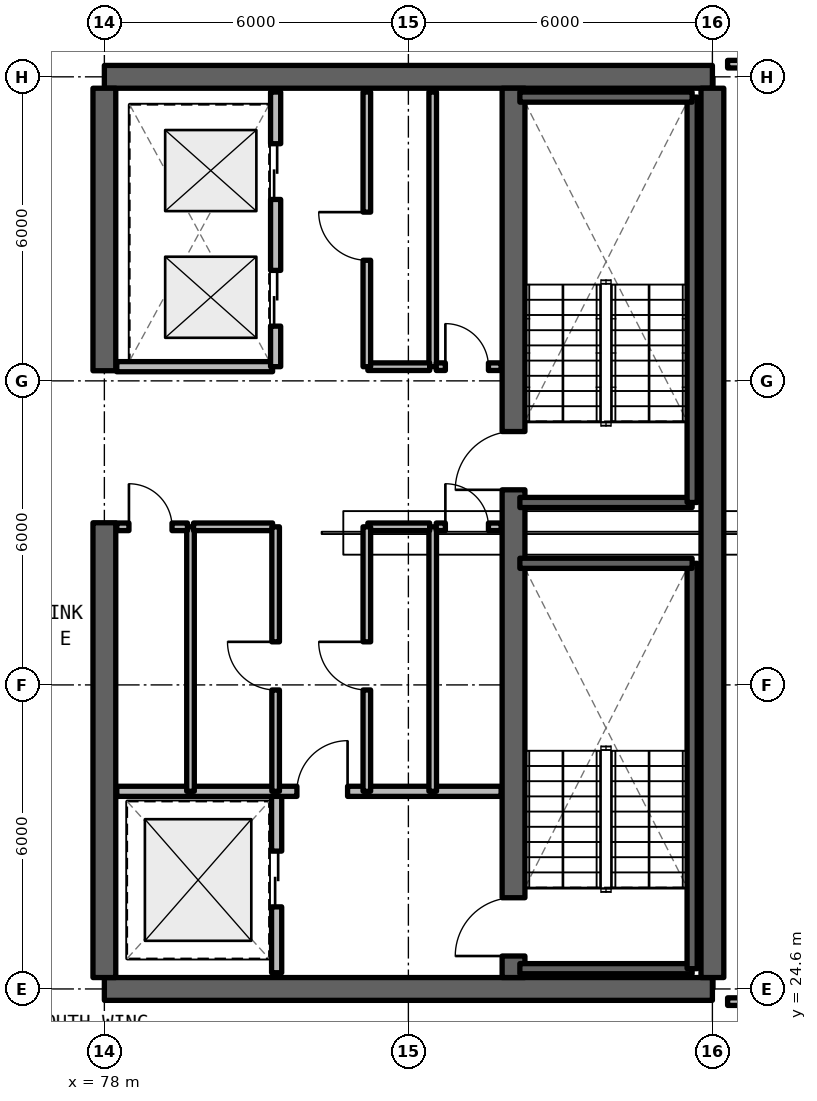
"""IFC4 building model, lengths in metres.
Left out: names, types, materials, properties, quantities, classifications, styles, units other than length and angle.
Written with IfcOpenShell. Run it as: python <this file> out.ifc"""

import sys

from ifc_helpers import new_model, si_unit, direction, frame, frame_2d, origin, place, context, subcontext, project, spatial, rectangle, extrude, element, fill, save


model = new_model("IFC4")
c1 = context("Model", 3, precision=1e-05, world=origin(), true_north=direction((0.0, 1.0)))
c2 = subcontext(c1, "Body", "Model", "MODEL_VIEW")
j1 = project(units=[si_unit("LENGTHUNIT", "METRE"), si_unit("PLANEANGLEUNIT", "RADIAN")], contexts=[c1])
p1 = place(None, origin())
s1 = spatial("IfcSite", under=j1, at=p1, CompositionType="ELEMENT")
p2 = place(p1, origin())
s2 = spatial("IfcBuilding", under=s1, at=p2, CompositionType="ELEMENT")
p3 = place(p2, frame((0.0, 0.0, 232.65)))
s3 = spatial("IfcBuildingStorey", under=s2, at=p3, CompositionType="ELEMENT", Elevation=232.65)
for number, where, z_axis, x_axis in (
    (1, (78.0, 24.6, 0.0), (0.0, 0.0, 1.0), (1.0, 0.0, 0.0)),
    (2, (90.0, 42.6, 0.0), (0.0, 0.0, 1.0), (-1.0, 0.0, 0.0)),
):
    element("IfcWall", number, at=place(p3, frame(where, z_axis=z_axis, x_axis=x_axis)), inside=s3, PredefinedType="SHEAR", context=c2, shape_type="SweptSolid", body=[
        extrude(rectangle(XDim=12.0, YDim=0.45, at=frame_2d((6.0, 0.0))), origin(), (0.0, 0.0, 1.0), 3.3),
    ])
p4 = place(p3, frame((90.0, 24.825, 0.0), z_axis=(0.0, 0.0, 1.0), x_axis=(0.0, 1.0, 0.0)))
e3 = element("IfcWall", 3, at=p4, inside=s3, PredefinedType="SHEAR", context=c2, shape_type="SweptSolid", body=[
    extrude(rectangle(XDim=17.55, YDim=0.45, at=frame_2d((8.775, 0.0))), origin(), (0.0, 0.0, 1.0), 3.3),
])
p5 = place(p3, frame((78.0, 24.825, 0.0), z_axis=(0.0, 0.0, 1.0), x_axis=(0.0, 1.0, 0.0)))
e4 = element("IfcWall", 4, at=p5, inside=s3, PredefinedType="SHEAR", context=c2, shape_type="SweptSolid", body=[
    extrude(rectangle(XDim=8.975, YDim=0.45, at=frame_2d((4.488, 0.0))), origin(), (0.0, 0.0, 1.0), 3.3),
])
p6 = place(p3, frame((78.0, 36.8, 0.0), z_axis=(0.0, 0.0, 1.0), x_axis=(0.0, 1.0, 0.0)))
e5 = element("IfcWall", 5, at=p6, inside=s3, PredefinedType="SHEAR", context=c2, shape_type="SweptSolid", body=[
    extrude(rectangle(XDim=5.575, YDim=0.45, at=frame_2d((2.788, 0.0))), origin(), (0.0, 0.0, 1.0), 3.3),
])
p7 = place(p3, frame((86.075, 24.825, 0.0), z_axis=(0.0, 0.0, 1.0), x_axis=(0.0, 1.0, 0.0)))
e6 = element("IfcWall", 6, at=p7, inside=s3, PredefinedType="SHEAR", context=c2, shape_type="SweptSolid", body=[
    extrude(rectangle(XDim=17.55, YDim=0.45, at=frame_2d((8.775, 0.0))), origin(), (0.0, 0.0, 1.0), 3.3),
])
p8 = place(p7, frame((0.425, 0.0, 0.0)))
e7 = element("IfcOpeningElement", 7, at=p8, cuts=e6, PredefinedType="OPENING", context=c2, shape_type="SweptSolid", body=[
    extrude(rectangle(XDim=1.15, YDim=2.15, at=frame_2d((0.575, 1.075))), frame((0.0, 0.235, 0.0), z_axis=(0.0, -1.0, 0.0), x_axis=(1.0, 0.0, 0.0)), (0.0, 0.0, 1.0), 0.47),
])
p9 = place(p7, frame((9.625, 0.0, 0.0)))
e8 = element("IfcOpeningElement", 8, at=p9, cuts=e6, PredefinedType="OPENING", context=c2, shape_type="SweptSolid", body=[
    extrude(rectangle(XDim=1.15, YDim=2.15, at=frame_2d((0.575, 1.075))), frame((0.0, 0.235, 0.0), z_axis=(0.0, -1.0, 0.0), x_axis=(1.0, 0.0, 0.0)), (0.0, 0.0, 1.0), 0.47),
])
p10 = place(p3, frame((81.4, 24.92, 0.0), z_axis=(0.0, 0.0, 1.0), x_axis=(0.0, 1.0, 0.0)))
e9 = element("IfcWall", 9, at=p10, inside=s3, PredefinedType="SOLIDWALL", context=c2, shape_type="SweptSolid", body=[
    extrude(rectangle(XDim=3.58, YDim=0.2, at=frame_2d((1.79, 0.0))), origin(), (0.0, 0.0, 1.0), 2.35),
])
p11 = place(p10, frame((1.3, 0.0, 0.0)))
e10 = element("IfcOpeningElement", 10, at=p11, cuts=e9, PredefinedType="OPENING", context=c2, shape_type="SweptSolid", body=[
    extrude(rectangle(XDim=1.1, YDim=2.2, at=frame_2d((0.55, 1.1))), frame((0.0, 0.11, 0.0), z_axis=(0.0, -1.0, 0.0), x_axis=(1.0, 0.0, 0.0)), (0.0, 0.0, 1.0), 0.22),
])
p12 = place(p3, frame((78.245, 28.5, 0.0), z_axis=(0.0, 0.0, 1.0), x_axis=(1.0, 0.0, 0.0)))
e11 = element("IfcWall", 11, at=p12, inside=s3, PredefinedType="SOLIDWALL", context=c2, shape_type="SweptSolid", body=[
    extrude(rectangle(XDim=7.585, YDim=0.2, at=frame_2d((3.792, 0.0))), origin(), (0.0, 0.0, 1.0), 2.35),
])
p13 = place(p12, frame((3.555, 0.0, 0.0)))
e12 = element("IfcOpeningElement", 12, at=p13, cuts=e11, PredefinedType="OPENING", context=c2, shape_type="SweptSolid", body=[
    extrude(rectangle(XDim=1.0, YDim=2.15, at=frame_2d((0.5, 1.075))), frame((0.0, 0.11, 0.0), z_axis=(0.0, -1.0, 0.0), x_axis=(1.0, 0.0, 0.0)), (0.0, 0.0, 1.0), 0.22),
])
p14 = place(p3, frame((84.48, 28.5, 0.0), z_axis=(0.0, 0.0, 1.0), x_axis=(0.0, 1.0, 0.0)))
e13 = element("IfcWall", 13, at=p14, inside=s3, PredefinedType="SOLIDWALL", context=c2, shape_type="SweptSolid", body=[
    extrude(rectangle(XDim=5.22, YDim=0.15, at=frame_2d((2.61, 0.0))), origin(), (0.0, 0.0, 1.0), 2.35),
])
p15 = place(p3, frame((84.55, 33.72, 0.0), z_axis=(0.0, 0.0, 1.0), x_axis=(1.0, 0.0, 0.0)))
e14 = element("IfcWall", 14, at=p15, inside=s3, PredefinedType="SOLIDWALL", context=c2, shape_type="SweptSolid", body=[
    extrude(rectangle(XDim=1.28, YDim=0.15, at=frame_2d((0.64, 0.0))), origin(), (0.0, 0.0, 1.0), 2.35),
])
p16 = place(p15, frame((0.18, 0.0, 0.0)))
e15 = element("IfcOpeningElement", 15, at=p16, cuts=e14, PredefinedType="OPENING", context=c2, shape_type="SweptSolid", body=[
    extrude(rectangle(XDim=0.85, YDim=2.1, at=frame_2d((0.425, 1.05))), frame((0.0, 0.085, 0.0), z_axis=(0.0, -1.0, 0.0), x_axis=(1.0, 0.0, 0.0)), (0.0, 0.0, 1.0), 0.17),
])
p17 = place(p3, frame((83.2, 33.72, 0.0), z_axis=(0.0, 0.0, 1.0), x_axis=(1.0, 0.0, 0.0)))
e16 = element("IfcWall", 16, at=p17, inside=s3, PredefinedType="SOLIDWALL", context=c2, shape_type="SweptSolid", body=[
    extrude(rectangle(XDim=1.22, YDim=0.15, at=frame_2d((0.61, 0.0))), origin(), (0.0, 0.0, 1.0), 2.35),
])
p18 = place(p3, frame((83.18, 28.5, 0.0), z_axis=(0.0, 0.0, 1.0), x_axis=(0.0, 1.0, 0.0)))
e17 = element("IfcWall", 17, at=p18, inside=s3, PredefinedType="SOLIDWALL", context=c2, shape_type="SweptSolid", body=[
    extrude(rectangle(XDim=5.22, YDim=0.15, at=frame_2d((2.61, 0.0))), origin(), (0.0, 0.0, 1.0), 2.35),
])
p19 = place(p18, frame((2.0, 0.0, 0.0)))
e18 = element("IfcOpeningElement", 18, at=p19, cuts=e17, PredefinedType="OPENING", context=c2, shape_type="SweptSolid", body=[
    extrude(rectangle(XDim=0.95, YDim=2.15, at=frame_2d((0.475, 1.075))), frame((0.0, 0.085, 0.0), z_axis=(0.0, -1.0, 0.0), x_axis=(1.0, 0.0, 0.0)), (0.0, 0.0, 1.0), 0.17),
])
p20 = place(p3, frame((79.7, 28.5, 0.0), z_axis=(0.0, 0.0, 1.0), x_axis=(0.0, 1.0, 0.0)))
e19 = element("IfcWall", 19, at=p20, inside=s3, PredefinedType="SOLIDWALL", context=c2, shape_type="SweptSolid", body=[
    extrude(rectangle(XDim=5.22, YDim=0.15, at=frame_2d((2.61, 0.0))), origin(), (0.0, 0.0, 1.0), 2.35),
])
p21 = place(p3, frame((79.76, 33.72, 0.0), z_axis=(0.0, 0.0, 1.0), x_axis=(1.0, 0.0, 0.0)))
e20 = element("IfcWall", 20, at=p21, inside=s3, PredefinedType="SOLIDWALL", context=c2, shape_type="SweptSolid", body=[
    extrude(rectangle(XDim=1.56, YDim=0.15, at=frame_2d((0.78, 0.0))), origin(), (0.0, 0.0, 1.0), 2.35),
])
p22 = place(p3, frame((78.245, 33.72, 0.0), z_axis=(0.0, 0.0, 1.0), x_axis=(1.0, 0.0, 0.0)))
e21 = element("IfcWall", 21, at=p22, inside=s3, PredefinedType="SOLIDWALL", context=c2, shape_type="SweptSolid", body=[
    extrude(rectangle(XDim=1.395, YDim=0.15, at=frame_2d((0.697, 0.0))), origin(), (0.0, 0.0, 1.0), 2.35),
])
p23 = place(p22, frame((0.24, 0.0, 0.0)))
e22 = element("IfcOpeningElement", 22, at=p23, cuts=e21, PredefinedType="OPENING", context=c2, shape_type="SweptSolid", body=[
    extrude(rectangle(XDim=0.85, YDim=2.1, at=frame_2d((0.425, 1.05))), frame((0.0, 0.085, 0.0), z_axis=(0.0, -1.0, 0.0), x_axis=(1.0, 0.0, 0.0)), (0.0, 0.0, 1.0), 0.17),
])
p24 = place(p3, frame((81.38, 28.5, 0.0), z_axis=(0.0, 0.0, 1.0), x_axis=(0.0, 1.0, 0.0)))
e23 = element("IfcWall", 23, at=p24, inside=s3, PredefinedType="SOLIDWALL", context=c2, shape_type="SweptSolid", body=[
    extrude(rectangle(XDim=5.22, YDim=0.15, at=frame_2d((2.61, 0.0))), origin(), (0.0, 0.0, 1.0), 2.35),
])
p25 = place(p24, frame((2.0, 0.0, 0.0)))
e24 = element("IfcOpeningElement", 24, at=p25, cuts=e23, PredefinedType="OPENING", context=c2, shape_type="SweptSolid", body=[
    extrude(rectangle(XDim=0.95, YDim=2.15, at=frame_2d((0.475, 1.075))), frame((0.0, 0.085, 0.0), z_axis=(0.0, -1.0, 0.0), x_axis=(1.0, 0.0, 0.0)), (0.0, 0.0, 1.0), 0.17),
])
p26 = place(p3, frame((84.48, 36.88, 0.0), z_axis=(0.0, 0.0, 1.0), x_axis=(0.0, 1.0, 0.0)))
e25 = element("IfcWall", 25, at=p26, inside=s3, PredefinedType="SOLIDWALL", context=c2, shape_type="SweptSolid", body=[
    extrude(rectangle(XDim=5.42, YDim=0.15, at=frame_2d((2.71, 0.0))), origin(), (0.0, 0.0, 1.0), 2.35),
])
p27 = place(p3, frame((84.55, 36.88, 0.0), z_axis=(0.0, 0.0, 1.0), x_axis=(1.0, 0.0, 0.0)))
e26 = element("IfcWall", 26, at=p27, inside=s3, PredefinedType="SOLIDWALL", context=c2, shape_type="SweptSolid", body=[
    extrude(rectangle(XDim=1.28, YDim=0.15, at=frame_2d((0.64, 0.0))), origin(), (0.0, 0.0, 1.0), 2.35),
])
p28 = place(p27, frame((0.18, 0.0, 0.0)))
e27 = element("IfcOpeningElement", 27, at=p28, cuts=e26, PredefinedType="OPENING", context=c2, shape_type="SweptSolid", body=[
    extrude(rectangle(XDim=0.85, YDim=2.1, at=frame_2d((0.425, 1.05))), frame((0.0, 0.085, 0.0), z_axis=(0.0, -1.0, 0.0), x_axis=(1.0, 0.0, 0.0)), (0.0, 0.0, 1.0), 0.17),
])
p29 = place(p3, frame((83.2, 36.88, 0.0), z_axis=(0.0, 0.0, 1.0), x_axis=(1.0, 0.0, 0.0)))
e28 = element("IfcWall", 28, at=p29, inside=s3, PredefinedType="SOLIDWALL", context=c2, shape_type="SweptSolid", body=[
    extrude(rectangle(XDim=1.22, YDim=0.15, at=frame_2d((0.61, 0.0))), origin(), (0.0, 0.0, 1.0), 2.35),
])
p30 = place(p3, frame((83.18, 36.88, 0.0), z_axis=(0.0, 0.0, 1.0), x_axis=(0.0, 1.0, 0.0)))
e29 = element("IfcWall", 29, at=p30, inside=s3, PredefinedType="SOLIDWALL", context=c2, shape_type="SweptSolid", body=[
    extrude(rectangle(XDim=5.42, YDim=0.15, at=frame_2d((2.71, 0.0))), origin(), (0.0, 0.0, 1.0), 2.35),
])
p31 = place(p30, frame((2.1, 0.0, 0.0)))
e30 = element("IfcOpeningElement", 30, at=p31, cuts=e29, PredefinedType="OPENING", context=c2, shape_type="SweptSolid", body=[
    extrude(rectangle(XDim=0.95, YDim=2.15, at=frame_2d((0.475, 1.075))), frame((0.0, 0.085, 0.0), z_axis=(0.0, -1.0, 0.0), x_axis=(1.0, 0.0, 0.0)), (0.0, 0.0, 1.0), 0.17),
])
p32 = place(p3, frame((78.245, 36.88, 0.0), z_axis=(0.0, 0.0, 1.0), x_axis=(1.0, 0.0, 0.0)))
e31 = element("IfcWall", 31, at=p32, inside=s3, PredefinedType="SOLIDWALL", context=c2, shape_type="SweptSolid", body=[
    extrude(rectangle(XDim=3.075, YDim=0.2, at=frame_2d((1.538, 0.0))), origin(), (0.0, 0.0, 1.0), 2.35),
])
p33 = place(p3, frame((81.38, 36.88, 0.0), z_axis=(0.0, 0.0, 1.0), x_axis=(0.0, 1.0, 0.0)))
e32 = element("IfcWall", 32, at=p33, inside=s3, PredefinedType="SOLIDWALL", context=c2, shape_type="SweptSolid", body=[
    extrude(rectangle(XDim=5.42, YDim=0.2, at=frame_2d((2.71, 0.0))), origin(), (0.0, 0.0, 1.0), 2.35),
])
p34 = place(p33, frame((0.8, 0.0, 0.0)))
e33 = element("IfcOpeningElement", 33, at=p34, cuts=e32, PredefinedType="OPENING", context=c2, shape_type="SweptSolid", body=[
    extrude(rectangle(XDim=1.1, YDim=2.2, at=frame_2d((0.55, 1.1))), frame((0.0, 0.11, 0.0), z_axis=(0.0, -1.0, 0.0), x_axis=(1.0, 0.0, 0.0)), (0.0, 0.0, 1.0), 0.22),
])
p35 = place(p33, frame((3.3, 0.0, 0.0)))
e34 = element("IfcOpeningElement", 34, at=p35, cuts=e32, PredefinedType="OPENING", context=c2, shape_type="SweptSolid", body=[
    extrude(rectangle(XDim=1.1, YDim=2.2, at=frame_2d((0.55, 1.1))), frame((0.0, 0.11, 0.0), z_axis=(0.0, -1.0, 0.0), x_axis=(1.0, 0.0, 0.0)), (0.0, 0.0, 1.0), 0.22),
])
p36 = place(p3, frame((90.3, 24.35, 0.0), z_axis=(0.0, 0.0, 1.0), x_axis=(1.0, 0.0, 0.0)))
e35 = element("IfcWall", 35, at=p36, inside=s3, PredefinedType="SOLIDWALL", context=c2, shape_type="SweptSolid", body=[
    extrude(rectangle(XDim=8.52, YDim=0.15, at=frame_2d((4.26, 0.0))), origin(), (0.0, 0.0, 1.0), 2.35),
])
p37 = place(p36, frame((0.975, 0.0, 0.0)))
e36 = element("IfcOpeningElement", 36, at=p37, cuts=e35, PredefinedType="OPENING", context=c2, shape_type="SweptSolid", body=[
    extrude(rectangle(XDim=0.95, YDim=2.15, at=frame_2d((0.475, 1.075))), frame((0.0, 0.085, 0.0), z_axis=(0.0, -1.0, 0.0), x_axis=(1.0, 0.0, 0.0)), (0.0, 0.0, 1.0), 0.17),
])
p38 = place(p3, frame((90.3, 42.85, 0.0), z_axis=(0.0, 0.0, 1.0), x_axis=(1.0, 0.0, 0.0)))
e37 = element("IfcWall", 37, at=p38, inside=s3, PredefinedType="SOLIDWALL", context=c2, shape_type="SweptSolid", body=[
    extrude(rectangle(XDim=8.52, YDim=0.15, at=frame_2d((4.26, 0.0))), origin(), (0.0, 0.0, 1.0), 2.35),
])
p39 = place(p3, frame((86.2, 25.0, 0.0), z_axis=(0.0, 0.0, 1.0), x_axis=(1.0, 0.0, 0.0)))
e38 = element("IfcWall", 38, at=p39, inside=s3, PredefinedType="SOLIDWALL", context=c2, shape_type="SweptSolid", body=[
    extrude(rectangle(XDim=3.4, YDim=0.2, at=frame_2d((1.7, 0.0))), origin(), (0.0, 0.0, 1.0), 3.3),
])
p40 = place(p3, frame((89.6, 25.0, 0.0), z_axis=(0.0, 0.0, 1.0), x_axis=(0.0, 1.0, 0.0)))
e39 = element("IfcWall", 39, at=p40, inside=s3, PredefinedType="SOLIDWALL", context=c2, shape_type="SweptSolid", body=[
    extrude(rectangle(XDim=8.0, YDim=0.2, at=frame_2d((4.0, 0.0))), origin(), (0.0, 0.0, 1.0), 3.3),
])
for number, where, z_axis, x_axis in (
    (40, (89.6, 33.0, 0.0), (0.0, 0.0, 1.0), (-1.0, 0.0, 0.0)),
    (41, (86.2, 34.2, 0.0), (0.0, 0.0, 1.0), (1.0, 0.0, 0.0)),
):
    element("IfcWall", number, at=place(p3, frame(where, z_axis=z_axis, x_axis=x_axis)), inside=s3, PredefinedType="SOLIDWALL", context=c2, shape_type="SweptSolid", body=[
        extrude(rectangle(XDim=3.4, YDim=0.2, at=frame_2d((1.7, 0.0))), origin(), (0.0, 0.0, 1.0), 3.3),
    ])
p41 = place(p3, frame((89.6, 34.2, 0.0), z_axis=(0.0, 0.0, 1.0), x_axis=(0.0, 1.0, 0.0)))
e42 = element("IfcWall", 42, at=p41, inside=s3, PredefinedType="SOLIDWALL", context=c2, shape_type="SweptSolid", body=[
    extrude(rectangle(XDim=8.0, YDim=0.2, at=frame_2d((4.0, 0.0))), origin(), (0.0, 0.0, 1.0), 3.3),
])
p42 = place(p3, frame((89.6, 42.2, 0.0), z_axis=(0.0, 0.0, 1.0), x_axis=(-1.0, 0.0, 0.0)))
e43 = element("IfcWall", 43, at=p42, inside=s3, PredefinedType="SOLIDWALL", context=c2, shape_type="SweptSolid", body=[
    extrude(rectangle(XDim=3.4, YDim=0.2, at=frame_2d((1.7, 0.0))), origin(), (0.0, 0.0, 1.0), 3.3),
])
p43 = place(p11, origin())
e44 = element("IfcDoor", 44, at=p43, inside=s3, OperationType="SLIDING_TO_LEFT", PredefinedType="DOOR", context=c2, shape_type="SweptSolid", body=[
    extrude(rectangle(XDim=1.1, YDim=2.2, at=frame_2d((0.55, 1.1))), frame((0.0, 0.025, 0.0), z_axis=(0.0, -1.0, 0.0), x_axis=(1.0, 0.0, 0.0)), (0.0, 0.0, 1.0), 0.05),
])
fill(e10, e44)
p44 = place(p13, origin())
e45 = element("IfcDoor", 45, at=p44, inside=s3, OperationType="SINGLE_SWING_RIGHT", PredefinedType="DOOR", context=c2, shape_type="SweptSolid", body=[
    extrude(rectangle(XDim=1.0, YDim=2.15, at=frame_2d((0.5, 1.075))), frame((0.0, 0.025, 0.0), z_axis=(0.0, -1.0, 0.0), x_axis=(1.0, 0.0, 0.0)), (0.0, 0.0, 1.0), 0.05),
])
fill(e12, e45)
p45 = place(p16, origin())
e46 = element("IfcDoor", 46, at=p45, inside=s3, OperationType="SINGLE_SWING_LEFT", PredefinedType="DOOR", context=c2, shape_type="SweptSolid", body=[
    extrude(rectangle(XDim=0.85, YDim=2.1, at=frame_2d((0.425, 1.05))), frame((0.0, 0.025, 0.0), z_axis=(0.0, -1.0, 0.0), x_axis=(1.0, 0.0, 0.0)), (0.0, 0.0, 1.0), 0.05),
])
fill(e15, e46)
p46 = place(p19, origin())
e47 = element("IfcDoor", 47, at=p46, inside=s3, OperationType="SINGLE_SWING_RIGHT", PredefinedType="DOOR", context=c2, shape_type="SweptSolid", body=[
    extrude(rectangle(XDim=0.95, YDim=2.15, at=frame_2d((0.475, 1.075))), frame((0.0, 0.025, 0.0), z_axis=(0.0, -1.0, 0.0), x_axis=(1.0, 0.0, 0.0)), (0.0, 0.0, 1.0), 0.05),
])
fill(e18, e47)
p47 = place(p23, origin())
e48 = element("IfcDoor", 48, at=p47, inside=s3, OperationType="SINGLE_SWING_LEFT", PredefinedType="DOOR", context=c2, shape_type="SweptSolid", body=[
    extrude(rectangle(XDim=0.85, YDim=2.1, at=frame_2d((0.425, 1.05))), frame((0.0, 0.025, 0.0), z_axis=(0.0, -1.0, 0.0), x_axis=(1.0, 0.0, 0.0)), (0.0, 0.0, 1.0), 0.05),
])
fill(e22, e48)
p48 = place(p25, origin())
e49 = element("IfcDoor", 49, at=p48, inside=s3, OperationType="SINGLE_SWING_RIGHT", PredefinedType="DOOR", context=c2, shape_type="SweptSolid", body=[
    extrude(rectangle(XDim=0.95, YDim=2.15, at=frame_2d((0.475, 1.075))), frame((0.0, 0.025, 0.0), z_axis=(0.0, -1.0, 0.0), x_axis=(1.0, 0.0, 0.0)), (0.0, 0.0, 1.0), 0.05),
])
fill(e24, e49)
p49 = place(p28, origin())
e50 = element("IfcDoor", 50, at=p49, inside=s3, OperationType="SINGLE_SWING_LEFT", PredefinedType="DOOR", context=c2, shape_type="SweptSolid", body=[
    extrude(rectangle(XDim=0.85, YDim=2.1, at=frame_2d((0.425, 1.05))), frame((0.0, 0.025, 0.0), z_axis=(0.0, -1.0, 0.0), x_axis=(1.0, 0.0, 0.0)), (0.0, 0.0, 1.0), 0.05),
])
fill(e27, e50)
p50 = place(p31, origin())
e51 = element("IfcDoor", 51, at=p50, inside=s3, OperationType="SINGLE_SWING_RIGHT", PredefinedType="DOOR", context=c2, shape_type="SweptSolid", body=[
    extrude(rectangle(XDim=0.95, YDim=2.15, at=frame_2d((0.475, 1.075))), frame((0.0, 0.025, 0.0), z_axis=(0.0, -1.0, 0.0), x_axis=(1.0, 0.0, 0.0)), (0.0, 0.0, 1.0), 0.05),
])
fill(e30, e51)
p51 = place(p34, origin())
e52 = element("IfcDoor", 52, at=p51, inside=s3, OperationType="SLIDING_TO_LEFT", PredefinedType="DOOR", context=c2, shape_type="SweptSolid", body=[
    extrude(rectangle(XDim=1.1, YDim=2.2, at=frame_2d((0.55, 1.1))), frame((0.0, 0.025, 0.0), z_axis=(0.0, -1.0, 0.0), x_axis=(1.0, 0.0, 0.0)), (0.0, 0.0, 1.0), 0.05),
])
fill(e33, e52)
p52 = place(p35, origin())
e53 = element("IfcDoor", 53, at=p52, inside=s3, OperationType="SLIDING_TO_RIGHT", PredefinedType="DOOR", context=c2, shape_type="SweptSolid", body=[
    extrude(rectangle(XDim=1.1, YDim=2.2, at=frame_2d((0.55, 1.1))), frame((0.0, 0.025, 0.0), z_axis=(0.0, -1.0, 0.0), x_axis=(1.0, 0.0, 0.0)), (0.0, 0.0, 1.0), 0.05),
])
fill(e34, e53)
p53 = place(p8, origin())
e54 = element("IfcDoor", 54, at=p53, inside=s3, OperationType="SINGLE_SWING_RIGHT", PredefinedType="DOOR", context=c2, shape_type="SweptSolid", body=[
    extrude(rectangle(XDim=1.15, YDim=2.15, at=frame_2d((0.575, 1.075))), frame((0.0, 0.025, 0.0), z_axis=(0.0, -1.0, 0.0), x_axis=(1.0, 0.0, 0.0)), (0.0, 0.0, 1.0), 0.05),
])
fill(e7, e54)
p54 = place(p9, origin())
e55 = element("IfcDoor", 55, at=p54, inside=s3, OperationType="SINGLE_SWING_LEFT", PredefinedType="DOOR", context=c2, shape_type="SweptSolid", body=[
    extrude(rectangle(XDim=1.15, YDim=2.15, at=frame_2d((0.575, 1.075))), frame((0.0, 0.025, 0.0), z_axis=(0.0, -1.0, 0.0), x_axis=(1.0, 0.0, 0.0)), (0.0, 0.0, 1.0), 0.05),
])
fill(e8, e55)
save(model, sys.argv[1])
